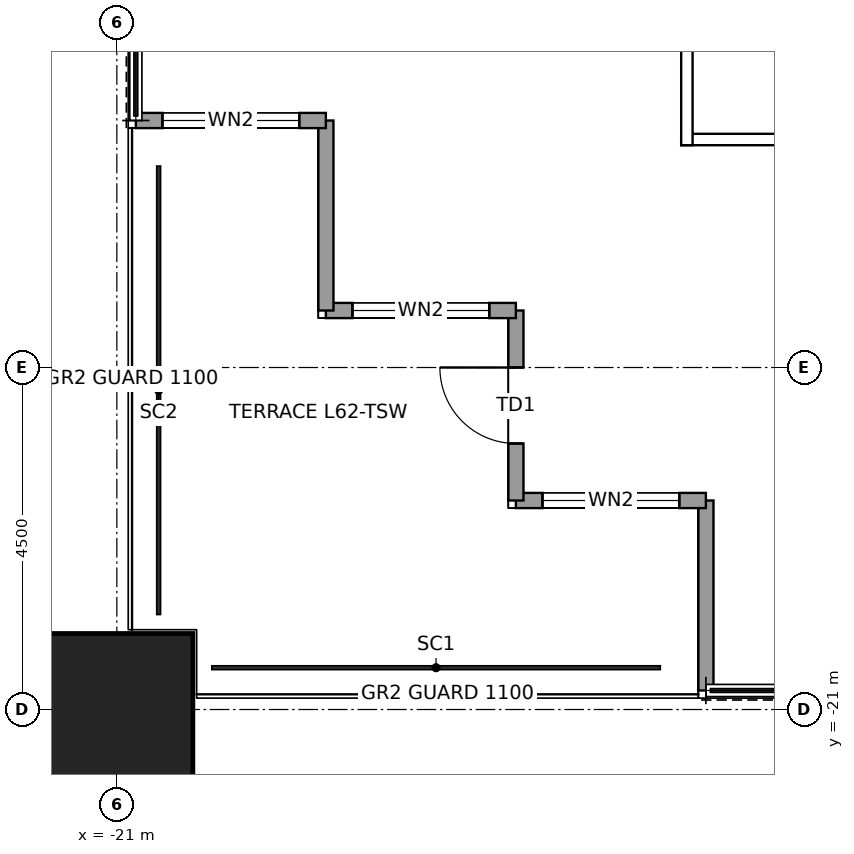
"""IFC4 building model, lengths in metres.
Left out: names, types, materials, properties, quantities, classifications, styles, units other than length and angle.
Written with IfcOpenShell. Run it as: python <this file> out.ifc"""

import sys

from ifc_helpers import new_model, si_unit, direction, frame, frame_2d, origin, origin_2d, place, context, subcontext, project, spatial, rectangle, hollow_rectangle, extrude, element, fill, save


model = new_model("IFC4")
c1 = context("Model", 3, precision=1e-05, world=origin(), true_north=direction((0.0, 1.0)))
c2 = subcontext(c1, "Body", "Model", "MODEL_VIEW")
j1 = project(units=[si_unit("LENGTHUNIT", "METRE"), si_unit("PLANEANGLEUNIT", "RADIAN")], contexts=[c1])
p1 = place(None, origin())
s1 = spatial("IfcSite", under=j1, at=p1, CompositionType="ELEMENT")
p2 = place(p1, origin())
s2 = spatial("IfcBuilding", under=s1, at=p2, CompositionType="ELEMENT")
p3 = place(p2, frame((0.0, 0.0, 283.9)))
s3 = spatial("IfcBuildingStorey", under=s2, at=p3, CompositionType="ELEMENT", Elevation=283.9)
p4 = place(p3, frame((-21.0, -21.0, 0.0), z_axis=(0.0, 0.0, 1.0), x_axis=(1.0, 0.0, 0.0)))
e1 = element("IfcColumn", 1, at=p4, inside=s3, PredefinedType="COLUMN", context=c2, shape_type="SweptSolid", body=[
    extrude(hollow_rectangle(XDim=2.0, YDim=2.0, WallThickness=0.095, at=origin_2d()), origin(), (0.0, 0.0, 1.0), 4.0),
])
p5 = place(p3, frame((-13.25, -20.75, 0.0), z_axis=(0.0, 0.0, 1.0), x_axis=(0.0, 1.0, 0.0)))
e2 = element("IfcWall", 2, at=p5, inside=s3, PredefinedType="SOLIDWALL", context=c2, shape_type="SweptSolid", body=[
    extrude(rectangle(XDim=2.5, YDim=0.2, at=frame_2d((1.25, 0.0))), origin(), (0.0, 0.0, 1.0), 3.85),
])
p6 = place(p3, frame((-13.25, -18.25, 0.0), z_axis=(0.0, 0.0, 1.0), x_axis=(-1.0, 0.0, 0.0)))
e3 = element("IfcWall", 3, at=p6, inside=s3, PredefinedType="SOLIDWALL", context=c2, shape_type="SweptSolid", body=[
    extrude(rectangle(XDim=2.5, YDim=0.2, at=frame_2d((1.25, 0.0))), origin(), (0.0, 0.0, 1.0), 3.85),
])
p7 = place(p6, frame((0.35, 0.0, 0.3)))
e4 = element("IfcOpeningElement", 4, at=p7, cuts=e3, PredefinedType="OPENING", context=c2, shape_type="SweptSolid", body=[
    extrude(rectangle(XDim=1.8, YDim=2.4, at=frame_2d((0.9, 1.2))), frame((0.0, 0.11, 0.0), z_axis=(0.0, -1.0, 0.0), x_axis=(1.0, 0.0, 0.0)), (0.0, 0.0, 1.0), 0.22),
])
p8 = place(p3, frame((-15.75, -18.25, 0.0), z_axis=(0.0, 0.0, 1.0), x_axis=(0.0, 1.0, 0.0)))
e5 = element("IfcWall", 5, at=p8, inside=s3, PredefinedType="SOLIDWALL", context=c2, shape_type="SweptSolid", body=[
    extrude(rectangle(XDim=2.5, YDim=0.2, at=frame_2d((1.25, 0.0))), origin(), (0.0, 0.0, 1.0), 3.317),
])
p9 = place(p8, frame((0.75, 0.0, 0.0)))
e6 = element("IfcOpeningElement", 6, at=p9, cuts=e5, PredefinedType="OPENING", context=c2, shape_type="SweptSolid", body=[
    extrude(rectangle(XDim=1.0, YDim=2.4, at=frame_2d((0.5, 1.2))), frame((0.0, 0.11, 0.0), z_axis=(0.0, -1.0, 0.0), x_axis=(1.0, 0.0, 0.0)), (0.0, 0.0, 1.0), 0.22),
])
p10 = place(p3, frame((-15.75, -15.75, 0.0), z_axis=(0.0, 0.0, 1.0), x_axis=(-1.0, 0.0, 0.0)))
e7 = element("IfcWall", 7, at=p10, inside=s3, PredefinedType="SOLIDWALL", context=c2, shape_type="SweptSolid", body=[
    extrude(rectangle(XDim=2.5, YDim=0.2, at=frame_2d((1.25, 0.0))), origin(), (0.0, 0.0, 1.0), 3.85),
])
p11 = place(p10, frame((0.35, 0.0, 0.3)))
e8 = element("IfcOpeningElement", 8, at=p11, cuts=e7, PredefinedType="OPENING", context=c2, shape_type="SweptSolid", body=[
    extrude(rectangle(XDim=1.8, YDim=2.4, at=frame_2d((0.9, 1.2))), frame((0.0, 0.11, 0.0), z_axis=(0.0, -1.0, 0.0), x_axis=(1.0, 0.0, 0.0)), (0.0, 0.0, 1.0), 0.22),
])
p12 = place(p3, frame((-18.25, -15.75, 0.0), z_axis=(0.0, 0.0, 1.0), x_axis=(0.0, 1.0, 0.0)))
e9 = element("IfcWall", 9, at=p12, inside=s3, PredefinedType="SOLIDWALL", context=c2, shape_type="SweptSolid", body=[
    extrude(rectangle(XDim=2.5, YDim=0.2, at=frame_2d((1.25, 0.0))), origin(), (0.0, 0.0, 1.0), 3.85),
])
p13 = place(p3, frame((-18.25, -13.25, 0.0), z_axis=(0.0, 0.0, 1.0), x_axis=(-1.0, 0.0, 0.0)))
e10 = element("IfcWall", 10, at=p13, inside=s3, PredefinedType="SOLIDWALL", context=c2, shape_type="SweptSolid", body=[
    extrude(rectangle(XDim=2.5, YDim=0.2, at=frame_2d((1.25, 0.0))), origin(), (0.0, 0.0, 1.0), 3.85),
])
p14 = place(p13, frame((0.35, 0.0, 0.3)))
e11 = element("IfcOpeningElement", 11, at=p14, cuts=e10, PredefinedType="OPENING", context=c2, shape_type="SweptSolid", body=[
    extrude(rectangle(XDim=1.8, YDim=2.4, at=frame_2d((0.9, 1.2))), frame((0.0, 0.11, 0.0), z_axis=(0.0, -1.0, 0.0), x_axis=(1.0, 0.0, 0.0)), (0.0, 0.0, 1.0), 0.22),
])
p15 = place(p3, frame((-13.575, -13.5, 0.0), z_axis=(0.0, 0.0, 1.0), x_axis=(1.0, 0.0, 0.0)))
e12 = element("IfcWall", 12, at=p15, inside=s3, PredefinedType="PARTITIONING", context=c2, shape_type="SweptSolid", body=[
    extrude(rectangle(XDim=11.15, YDim=0.15, at=frame_2d((5.575, 0.0))), origin(), (0.0, 0.0, 1.0), 3.85),
])
p16 = place(p15, frame((5.075, 0.0, 0.0)))
e13 = element("IfcOpeningElement", 13, at=p16, cuts=e12, PredefinedType="OPENING", context=c2, shape_type="SweptSolid", body=[
    extrude(rectangle(XDim=1.0, YDim=2.4, at=frame_2d((0.5, 1.2))), frame((0.0, 0.085, 0.0), z_axis=(0.0, -1.0, 0.0), x_axis=(1.0, 0.0, 0.0)), (0.0, 0.0, 1.0), 0.17),
])
p17 = place(p3, frame((-13.5, -13.575, 0.0), z_axis=(0.0, 0.0, 1.0), x_axis=(0.0, 1.0, 0.0)))
e14 = element("IfcWall", 14, at=p17, inside=s3, PredefinedType="PARTITIONING", context=c2, shape_type="SweptSolid", body=[
    extrude(rectangle(XDim=13.65, YDim=0.15, at=frame_2d((6.825, 0.0))), origin(), (0.0, 0.0, 1.0), 3.85),
])
p18 = place(p7, origin())
e15 = element("IfcWindow", 15, at=p18, inside=s3, PartitioningType="SINGLE_PANEL", PredefinedType="WINDOW", context=c2, shape_type="SweptSolid", body=[
    extrude(rectangle(XDim=1.8, YDim=2.4, at=frame_2d((0.9, 1.2))), frame((0.0, 0.03, 0.0), z_axis=(0.0, -1.0, 0.0), x_axis=(1.0, 0.0, 0.0)), (0.0, 0.0, 1.0), 0.06),
])
fill(e4, e15)
p19 = place(p9, origin())
e16 = element("IfcDoor", 16, at=p19, inside=s3, OperationType="SINGLE_SWING_RIGHT", PredefinedType="DOOR", context=c2, shape_type="SweptSolid", body=[
    extrude(rectangle(XDim=1.0, YDim=2.4, at=frame_2d((0.5, 1.2))), frame((0.0, 0.025, 0.0), z_axis=(0.0, -1.0, 0.0), x_axis=(1.0, 0.0, 0.0)), (0.0, 0.0, 1.0), 0.05),
])
fill(e6, e16)
p20 = place(p11, origin())
e17 = element("IfcWindow", 17, at=p20, inside=s3, PartitioningType="SINGLE_PANEL", PredefinedType="WINDOW", context=c2, shape_type="SweptSolid", body=[
    extrude(rectangle(XDim=1.8, YDim=2.4, at=frame_2d((0.9, 1.2))), frame((0.0, 0.03, 0.0), z_axis=(0.0, -1.0, 0.0), x_axis=(1.0, 0.0, 0.0)), (0.0, 0.0, 1.0), 0.06),
])
fill(e8, e17)
p21 = place(p14, origin())
e18 = element("IfcWindow", 18, at=p21, inside=s3, PartitioningType="SINGLE_PANEL", PredefinedType="WINDOW", context=c2, shape_type="SweptSolid", body=[
    extrude(rectangle(XDim=1.8, YDim=2.4, at=frame_2d((0.9, 1.2))), frame((0.0, 0.03, 0.0), z_axis=(0.0, -1.0, 0.0), x_axis=(1.0, 0.0, 0.0)), (0.0, 0.0, 1.0), 0.06),
])
fill(e11, e18)
save(model, sys.argv[1])
